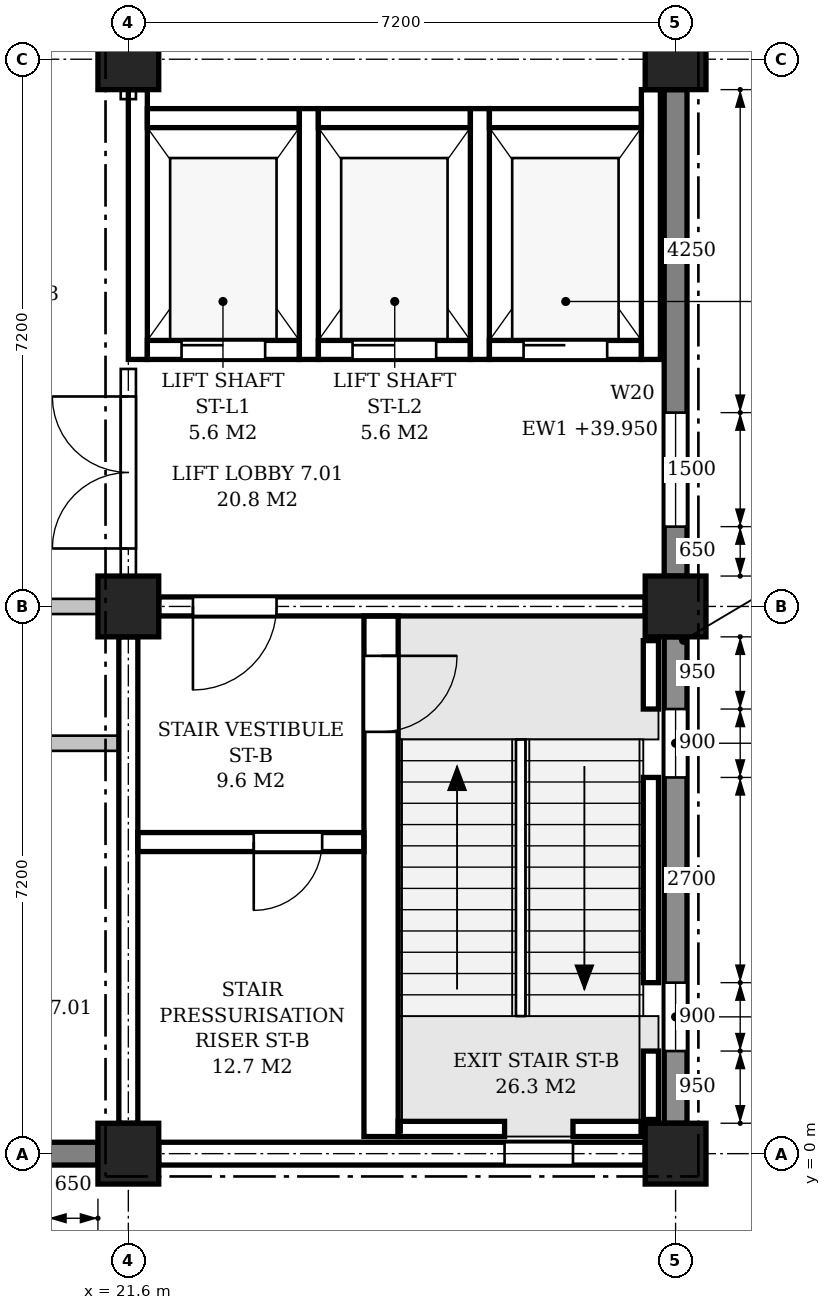
"""IFC4 building model, lengths in metres.
Left out: names, types, materials, properties, quantities, classifications, styles, units other than length and angle.
Written with IfcOpenShell. Run it as: python <this file> out.ifc"""

import sys

from ifc_helpers import new_model, si_unit, direction, frame, frame_2d, origin, origin_2d, place, context, subcontext, project, spatial, polyline, rectangle, outline, extrude, element, fill, save


model = new_model("IFC4")
c1 = context("Model", 3, precision=1e-05, world=origin(), true_north=direction((0.0, 1.0)))
c2 = subcontext(c1, "Body", "Model", "MODEL_VIEW")
j1 = project(units=[si_unit("LENGTHUNIT", "METRE"), si_unit("PLANEANGLEUNIT", "RADIAN")], contexts=[c1])
p1 = place(None, origin())
s1 = spatial("IfcSite", under=j1, at=p1, CompositionType="ELEMENT")
p2 = place(p1, origin())
s2 = spatial("IfcBuilding", under=s1, at=p2, CompositionType="ELEMENT")
p3 = place(p2, frame((0.0, 0.0, 36.0)))
s3 = spatial("IfcBuildingStorey", under=s2, at=p3, CompositionType="ELEMENT", Elevation=36.0)
for number, where, z_axis, x_axis in (
    (1, (21.6, 0.0, 0.0), (0.0, 0.0, 1.0), (1.0, 0.0, 0.0)),
    (2, (21.6, 7.2, 0.0), (0.0, 0.0, 1.0), (1.0, 0.0, 0.0)),
    (3, (21.6, 14.4, 0.0), (0.0, 0.0, 1.0), (1.0, 0.0, 0.0)),
    (4, (28.8, 0.0, 0.0), (0.0, 0.0, 1.0), (1.0, 0.0, 0.0)),
    (5, (28.8, 7.2, 0.0), (0.0, 0.0, 1.0), (1.0, 0.0, 0.0)),
    (6, (28.8, 14.4, 0.0), (0.0, 0.0, 1.0), (1.0, 0.0, 0.0)),
):
    element("IfcColumn", number, at=place(p3, frame(where, z_axis=z_axis, x_axis=x_axis)), inside=s3, PredefinedType="COLUMN", context=c2, shape_type="SweptSolid", body=[
        extrude(rectangle(XDim=0.8, YDim=0.8, at=origin_2d()), origin(), (0.0, 0.0, 1.0), 4.8),
    ])
p4 = place(p3, frame((14.8, 0.0, 0.0), z_axis=(0.0, 0.0, 1.0), x_axis=(1.0, 0.0, 0.0)))
e7 = element("IfcWall", 7, at=p4, inside=s3, PredefinedType="STANDARD", context=c2, shape_type="SweptSolid", body=[
    extrude(rectangle(XDim=6.4, YDim=0.3, at=frame_2d((3.2, 0.0))), origin(), (0.0, 0.0, 1.0), 3.95),
])
p5 = place(p4, frame((0.65, 0.0, 0.9)))
e8 = element("IfcOpeningElement", 8, at=p5, cuts=e7, PredefinedType="OPENING", context=c2, shape_type="SweptSolid", body=[
    extrude(outline(polyline([(0.0, 0.0), (1.5, 0.0), (1.5, 2.25), (0.75, 3.0), (0.0, 2.25), (0.0, 0.0)])), frame((0.0, 0.16, 0.0), z_axis=(0.0, -1.0, 0.0), x_axis=(1.0, 0.0, 0.0)), (0.0, 0.0, 1.0), 0.32),
])
p6 = place(p4, frame((4.25, 0.0, 0.9)))
e9 = element("IfcOpeningElement", 9, at=p6, cuts=e7, PredefinedType="OPENING", context=c2, shape_type="SweptSolid", body=[
    extrude(outline(polyline([(0.0, 0.0), (1.5, 0.0), (1.5, 2.25), (0.75, 3.0), (0.0, 2.25), (0.0, 0.0)])), frame((0.0, 0.16, 0.0), z_axis=(0.0, -1.0, 0.0), x_axis=(1.0, 0.0, 0.0)), (0.0, 0.0, 1.0), 0.32),
])
p7 = place(p3, frame((22.0, 0.0, 0.0), z_axis=(0.0, 0.0, 1.0), x_axis=(1.0, 0.0, 0.0)))
e10 = element("IfcWall", 10, at=p7, inside=s3, PredefinedType="STANDARD", context=c2, shape_type="SweptSolid", body=[
    extrude(rectangle(XDim=6.4, YDim=0.3, at=frame_2d((3.2, 0.0))), origin(), (0.0, 0.0, 1.0), 3.95),
])
p8 = place(p7, frame((4.55, 0.0, 0.9)))
e11 = element("IfcOpeningElement", 11, at=p8, cuts=e10, PredefinedType="OPENING", context=c2, shape_type="SweptSolid", body=[
    extrude(outline(polyline([(0.0, 0.0), (0.9, 0.0), (0.9, 2.55), (0.45, 3.0), (0.0, 2.55), (0.0, 0.0)])), frame((0.0, 0.16, 0.0), z_axis=(0.0, -1.0, 0.0), x_axis=(1.0, 0.0, 0.0)), (0.0, 0.0, 1.0), 0.32),
])
p9 = place(p3, frame((28.8, 0.4, 0.0), z_axis=(0.0, 0.0, 1.0), x_axis=(0.0, 1.0, 0.0)))
e12 = element("IfcWall", 12, at=p9, inside=s3, PredefinedType="STANDARD", context=c2, shape_type="SweptSolid", body=[
    extrude(rectangle(XDim=6.4, YDim=0.3, at=frame_2d((3.2, 0.0))), origin(), (0.0, 0.0, 1.0), 3.95),
])
p10 = place(p9, frame((0.95, 0.0, 0.9)))
e13 = element("IfcOpeningElement", 13, at=p10, cuts=e12, PredefinedType="OPENING", context=c2, shape_type="SweptSolid", body=[
    extrude(outline(polyline([(0.0, 0.0), (0.9, 0.0), (0.9, 2.55), (0.45, 3.0), (0.0, 2.55), (0.0, 0.0)])), frame((0.0, 0.16, 0.0), z_axis=(0.0, -1.0, 0.0), x_axis=(1.0, 0.0, 0.0)), (0.0, 0.0, 1.0), 0.32),
])
p11 = place(p9, frame((4.55, 0.0, 0.9)))
e14 = element("IfcOpeningElement", 14, at=p11, cuts=e12, PredefinedType="OPENING", context=c2, shape_type="SweptSolid", body=[
    extrude(outline(polyline([(0.0, 0.0), (0.9, 0.0), (0.9, 2.55), (0.45, 3.0), (0.0, 2.55), (0.0, 0.0)])), frame((0.0, 0.16, 0.0), z_axis=(0.0, -1.0, 0.0), x_axis=(1.0, 0.0, 0.0)), (0.0, 0.0, 1.0), 0.32),
])
p12 = place(p3, frame((28.8, 7.6, 0.0), z_axis=(0.0, 0.0, 1.0), x_axis=(0.0, 1.0, 0.0)))
e15 = element("IfcWall", 15, at=p12, inside=s3, PredefinedType="STANDARD", context=c2, shape_type="SweptSolid", body=[
    extrude(rectangle(XDim=6.4, YDim=0.3, at=frame_2d((3.2, 0.0))), origin(), (0.0, 0.0, 1.0), 3.95),
])
p13 = place(p12, frame((0.65, 0.0, 0.9)))
e16 = element("IfcOpeningElement", 16, at=p13, cuts=e15, PredefinedType="OPENING", context=c2, shape_type="SweptSolid", body=[
    extrude(outline(polyline([(0.0, 0.0), (1.5, 0.0), (1.5, 2.25), (0.75, 3.0), (0.0, 2.25), (0.0, 0.0)])), frame((0.0, 0.16, 0.0), z_axis=(0.0, -1.0, 0.0), x_axis=(1.0, 0.0, 0.0)), (0.0, 0.0, 1.0), 0.32),
])
p14 = place(p3, frame((22.0, 7.2, 0.0), z_axis=(0.0, 0.0, 1.0), x_axis=(1.0, 0.0, 0.0)))
e17 = element("IfcWall", 17, at=p14, inside=s3, PredefinedType="SHEAR", context=c2, shape_type="SweptSolid", body=[
    extrude(rectangle(XDim=6.4, YDim=0.25, at=frame_2d((3.2, 0.0))), origin(), (0.0, 0.0, 1.0), 3.85),
])
p15 = place(p14, frame((0.45, 0.0, 0.0)))
e18 = element("IfcOpeningElement", 18, at=p15, cuts=e17, PredefinedType="OPENING", context=c2, shape_type="SweptSolid", body=[
    extrude(rectangle(XDim=1.1, YDim=2.1, at=frame_2d((0.55, 1.05))), frame((0.0, 0.135, 0.0), z_axis=(0.0, -1.0, 0.0), x_axis=(1.0, 0.0, 0.0)), (0.0, 0.0, 1.0), 0.27),
])
p16 = place(p3, frame((21.6, 0.4, 0.0), z_axis=(0.0, 0.0, 1.0), x_axis=(0.0, 1.0, 0.0)))
e19 = element("IfcWall", 19, at=p16, inside=s3, PredefinedType="SHEAR", context=c2, shape_type="SweptSolid", body=[
    extrude(rectangle(XDim=6.4, YDim=0.25, at=frame_2d((3.2, 0.0))), origin(), (0.0, 0.0, 1.0), 3.85),
])
p17 = place(p3, frame((28.475, 0.45, -0.25), z_axis=(0.0, 0.0, 1.0), x_axis=(0.0, 1.0, 0.0)))
e20 = element("IfcWall", 20, at=p17, inside=s3, PredefinedType="SHEAR", context=c2, shape_type="SweptSolid", body=[
    extrude(rectangle(XDim=0.9, YDim=0.2, at=frame_2d((0.45, 0.0))), origin(), (0.0, 0.0, 1.0), 4.8),
])
p18 = place(p3, frame((28.475, 2.25, -0.25), z_axis=(0.0, 0.0, 1.0), x_axis=(0.0, 1.0, 0.0)))
e21 = element("IfcWall", 21, at=p18, inside=s3, PredefinedType="SHEAR", context=c2, shape_type="SweptSolid", body=[
    extrude(rectangle(XDim=2.7, YDim=0.2, at=frame_2d((1.35, 0.0))), origin(), (0.0, 0.0, 1.0), 4.8),
])
p19 = place(p3, frame((28.475, 5.85, -0.25), z_axis=(0.0, 0.0, 1.0), x_axis=(0.0, 1.0, 0.0)))
e22 = element("IfcWall", 22, at=p19, inside=s3, PredefinedType="SHEAR", context=c2, shape_type="SweptSolid", body=[
    extrude(rectangle(XDim=0.9, YDim=0.2, at=frame_2d((0.45, 0.0))), origin(), (0.0, 0.0, 1.0), 4.8),
])
p20 = place(p3, frame((25.15, 0.325, -0.25), z_axis=(0.0, 0.0, 1.0), x_axis=(1.0, 0.0, 0.0)))
e23 = element("IfcWall", 23, at=p20, inside=s3, PredefinedType="SHEAR", context=c2, shape_type="SweptSolid", body=[
    extrude(rectangle(XDim=1.4, YDim=0.2, at=frame_2d((0.7, 0.0))), origin(), (0.0, 0.0, 1.0), 4.8),
])
p21 = place(p3, frame((27.45, 0.325, -0.25), z_axis=(0.0, 0.0, 1.0), x_axis=(1.0, 0.0, 0.0)))
e24 = element("IfcWall", 24, at=p21, inside=s3, PredefinedType="SHEAR", context=c2, shape_type="SweptSolid", body=[
    extrude(rectangle(XDim=0.9, YDim=0.2, at=frame_2d((0.45, 0.0))), origin(), (0.0, 0.0, 1.0), 4.8),
])
p22 = place(p3, frame((24.925, 0.225, 0.0), z_axis=(0.0, 0.0, 1.0), x_axis=(0.0, 1.0, 0.0)))
e25 = element("IfcWall", 25, at=p22, inside=s3, PredefinedType="SHEAR", context=c2, shape_type="SweptSolid", body=[
    extrude(rectangle(XDim=6.85, YDim=0.45, at=frame_2d((3.425, 0.0))), origin(), (0.0, 0.0, 1.0), 4.55),
])
p23 = place(p22, frame((5.325, 0.0, 0.0)))
e26 = element("IfcOpeningElement", 26, at=p23, cuts=e25, PredefinedType="OPENING", context=c2, shape_type="SweptSolid", body=[
    extrude(rectangle(XDim=1.0, YDim=2.1, at=frame_2d((0.5, 1.05))), frame((0.0, 0.235, 0.0), z_axis=(0.0, -1.0, 0.0), x_axis=(1.0, 0.0, 0.0)), (0.0, 0.0, 1.0), 0.47),
])
p24 = place(p3, frame((21.725, 4.1, 0.0), z_axis=(0.0, 0.0, 1.0), x_axis=(1.0, 0.0, 0.0)))
e27 = element("IfcWall", 27, at=p24, inside=s3, PredefinedType="SHEAR", context=c2, shape_type="SweptSolid", body=[
    extrude(rectangle(XDim=2.975, YDim=0.25, at=frame_2d((1.487, 0.0))), origin(), (0.0, 0.0, 1.0), 4.55),
])
p25 = place(p24, frame((1.525, 0.0, 0.0)))
e28 = element("IfcOpeningElement", 28, at=p25, cuts=e27, PredefinedType="OPENING", context=c2, shape_type="SweptSolid", body=[
    extrude(rectangle(XDim=0.9, YDim=2.1, at=frame_2d((0.45, 1.05))), frame((0.0, 0.135, 0.0), z_axis=(0.0, -1.0, 0.0), x_axis=(1.0, 0.0, 0.0)), (0.0, 0.0, 1.0), 0.27),
])
p26 = place(p3, frame((21.725, 10.45, -0.25), z_axis=(0.0, 0.0, 1.0), x_axis=(0.0, 1.0, 0.0)))
e29 = element("IfcWall", 29, at=p26, inside=s3, PredefinedType="SHEAR", context=c2, shape_type="SweptSolid", body=[
    extrude(rectangle(XDim=3.55, YDim=0.25, at=frame_2d((1.775, 0.0))), origin(), (0.0, 0.0, 1.0), 4.1),
])
for number, where, z_axis, x_axis in (
    (30, (23.975, 10.45, -0.25), (0.0, 0.0, 1.0), (0.0, 1.0, 0.0)),
    (31, (26.225, 10.45, -0.25), (0.0, 0.0, 1.0), (0.0, 1.0, 0.0)),
):
    element("IfcWall", number, at=place(p3, frame(where, z_axis=z_axis, x_axis=x_axis)), inside=s3, PredefinedType="SHEAR", context=c2, shape_type="SweptSolid", body=[
        extrude(rectangle(XDim=3.3, YDim=0.25, at=frame_2d((1.65, 0.0))), origin(), (0.0, 0.0, 1.0), 4.8),
    ])
p27 = place(p3, frame((28.475, 10.45, -0.25), z_axis=(0.0, 0.0, 1.0), x_axis=(0.0, 1.0, 0.0)))
e32 = element("IfcWall", 32, at=p27, inside=s3, PredefinedType="SHEAR", context=c2, shape_type="SweptSolid", body=[
    extrude(rectangle(XDim=3.55, YDim=0.25, at=frame_2d((1.775, 0.0))), origin(), (0.0, 0.0, 1.0), 4.8),
])
p28 = place(p3, frame((21.85, 10.575, -0.25), z_axis=(0.0, 0.0, 1.0), x_axis=(1.0, 0.0, 0.0)))
e33 = element("IfcWall", 33, at=p28, inside=s3, PredefinedType="SHEAR", context=c2, shape_type="SweptSolid", body=[
    extrude(rectangle(XDim=2.0, YDim=0.25, at=frame_2d((1.0, 0.0))), origin(), (0.0, 0.0, 1.0), 4.8),
])
p29 = place(p28, frame((0.45, 0.0, 0.25)))
e34 = element("IfcOpeningElement", 34, at=p29, cuts=e33, PredefinedType="OPENING", context=c2, shape_type="SweptSolid", body=[
    extrude(rectangle(XDim=1.1, YDim=2.1, at=frame_2d((0.55, 1.05))), frame((0.0, 0.135, 0.0), z_axis=(0.0, -1.0, 0.0), x_axis=(1.0, 0.0, 0.0)), (0.0, 0.0, 1.0), 0.27),
])
p30 = place(p3, frame((21.85, 13.625, -0.25), z_axis=(0.0, 0.0, 1.0), x_axis=(1.0, 0.0, 0.0)))
e35 = element("IfcWall", 35, at=p30, inside=s3, PredefinedType="SHEAR", context=c2, shape_type="SweptSolid", body=[
    extrude(rectangle(XDim=2.0, YDim=0.25, at=frame_2d((1.0, 0.0))), origin(), (0.0, 0.0, 1.0), 4.8),
])
p31 = place(p3, frame((24.1, 10.575, -0.25), z_axis=(0.0, 0.0, 1.0), x_axis=(1.0, 0.0, 0.0)))
e36 = element("IfcWall", 36, at=p31, inside=s3, PredefinedType="SHEAR", context=c2, shape_type="SweptSolid", body=[
    extrude(rectangle(XDim=2.0, YDim=0.25, at=frame_2d((1.0, 0.0))), origin(), (0.0, 0.0, 1.0), 4.8),
])
p32 = place(p31, frame((0.45, 0.0, 0.25)))
e37 = element("IfcOpeningElement", 37, at=p32, cuts=e36, PredefinedType="OPENING", context=c2, shape_type="SweptSolid", body=[
    extrude(rectangle(XDim=1.1, YDim=2.1, at=frame_2d((0.55, 1.05))), frame((0.0, 0.135, 0.0), z_axis=(0.0, -1.0, 0.0), x_axis=(1.0, 0.0, 0.0)), (0.0, 0.0, 1.0), 0.27),
])
p33 = place(p3, frame((24.1, 13.625, -0.25), z_axis=(0.0, 0.0, 1.0), x_axis=(1.0, 0.0, 0.0)))
e38 = element("IfcWall", 38, at=p33, inside=s3, PredefinedType="SHEAR", context=c2, shape_type="SweptSolid", body=[
    extrude(rectangle(XDim=2.0, YDim=0.25, at=frame_2d((1.0, 0.0))), origin(), (0.0, 0.0, 1.0), 4.8),
])
p34 = place(p3, frame((26.35, 10.575, -0.25), z_axis=(0.0, 0.0, 1.0), x_axis=(1.0, 0.0, 0.0)))
e39 = element("IfcWall", 39, at=p34, inside=s3, PredefinedType="SHEAR", context=c2, shape_type="SweptSolid", body=[
    extrude(rectangle(XDim=2.0, YDim=0.25, at=frame_2d((1.0, 0.0))), origin(), (0.0, 0.0, 1.0), 4.8),
])
p35 = place(p34, frame((0.45, 0.0, 0.25)))
e40 = element("IfcOpeningElement", 40, at=p35, cuts=e39, PredefinedType="OPENING", context=c2, shape_type="SweptSolid", body=[
    extrude(rectangle(XDim=1.1, YDim=2.1, at=frame_2d((0.55, 1.05))), frame((0.0, 0.135, 0.0), z_axis=(0.0, -1.0, 0.0), x_axis=(1.0, 0.0, 0.0)), (0.0, 0.0, 1.0), 0.27),
])
p36 = place(p3, frame((26.35, 13.625, -0.25), z_axis=(0.0, 0.0, 1.0), x_axis=(1.0, 0.0, 0.0)))
e41 = element("IfcWall", 41, at=p36, inside=s3, PredefinedType="SHEAR", context=c2, shape_type="SweptSolid", body=[
    extrude(rectangle(XDim=2.0, YDim=0.25, at=frame_2d((1.0, 0.0))), origin(), (0.0, 0.0, 1.0), 4.8),
])
p37 = place(p3, frame((7.325, 5.4, 0.0), z_axis=(0.0, 0.0, 1.0), x_axis=(1.0, 0.0, 0.0)))
e42 = element("IfcWall", 42, at=p37, inside=s3, PredefinedType="PARTITIONING", context=c2, shape_type="SweptSolid", body=[
    extrude(outline(polyline([(0.0, 0.0), (14.15, 0.0), (14.15, 3.85), (14.05, 3.85), (14.05, 4.55), (7.3, 4.55), (7.3, 3.85), (6.85, 3.85), (6.85, 4.55), (0.1, 4.55), (0.1, 3.85), (0.0, 3.85), (0.0, 0.0)])), frame((0.0, 0.1, 0.0), z_axis=(0.0, -1.0, 0.0), x_axis=(1.0, 0.0, 0.0)), (0.0, 0.0, 1.0), 0.2),
])
p38 = place(p37, frame((1.238, 0.0, 0.0)))
e43 = element("IfcOpeningElement", 43, at=p38, cuts=e42, PredefinedType="OPENING", context=c2, shape_type="SweptSolid", body=[
    extrude(rectangle(XDim=1.0, YDim=2.1, at=frame_2d((0.5, 1.05))), frame((0.0, 0.11, 0.0), z_axis=(0.0, -1.0, 0.0), x_axis=(1.0, 0.0, 0.0)), (0.0, 0.0, 1.0), 0.22),
])
p39 = place(p37, frame((4.775, 0.0, 0.0)))
e44 = element("IfcOpeningElement", 44, at=p39, cuts=e42, PredefinedType="OPENING", context=c2, shape_type="SweptSolid", body=[
    extrude(rectangle(XDim=1.0, YDim=2.1, at=frame_2d((0.5, 1.05))), frame((0.0, 0.11, 0.0), z_axis=(0.0, -1.0, 0.0), x_axis=(1.0, 0.0, 0.0)), (0.0, 0.0, 1.0), 0.22),
])
p40 = place(p37, frame((8.375, 0.0, 0.0)))
e45 = element("IfcOpeningElement", 45, at=p40, cuts=e42, PredefinedType="OPENING", context=c2, shape_type="SweptSolid", body=[
    extrude(rectangle(XDim=1.0, YDim=2.1, at=frame_2d((0.5, 1.05))), frame((0.0, 0.11, 0.0), z_axis=(0.0, -1.0, 0.0), x_axis=(1.0, 0.0, 0.0)), (0.0, 0.0, 1.0), 0.22),
])
p41 = place(p37, frame((11.913, 0.0, 0.0)))
e46 = element("IfcOpeningElement", 46, at=p41, cuts=e42, PredefinedType="OPENING", context=c2, shape_type="SweptSolid", body=[
    extrude(rectangle(XDim=1.0, YDim=2.1, at=frame_2d((0.5, 1.05))), frame((0.0, 0.11, 0.0), z_axis=(0.0, -1.0, 0.0), x_axis=(1.0, 0.0, 0.0)), (0.0, 0.0, 1.0), 0.22),
])
p42 = place(p3, frame((14.8, 7.2, 0.0), z_axis=(0.0, 0.0, 1.0), x_axis=(1.0, 0.0, 0.0)))
e47 = element("IfcWall", 47, at=p42, inside=s3, PredefinedType="PARTITIONING", context=c2, shape_type="SweptSolid", body=[
    extrude(rectangle(XDim=6.4, YDim=0.2, at=frame_2d((3.2, 0.0))), origin(), (0.0, 0.0, 1.0), 3.85),
])
p43 = place(p42, frame((4.3, 0.0, 0.0)))
e48 = element("IfcOpeningElement", 48, at=p43, cuts=e47, PredefinedType="OPENING", context=c2, shape_type="SweptSolid", body=[
    extrude(rectangle(XDim=1.0, YDim=2.1, at=frame_2d((0.5, 1.05))), frame((0.0, 0.11, 0.0), z_axis=(0.0, -1.0, 0.0), x_axis=(1.0, 0.0, 0.0)), (0.0, 0.0, 1.0), 0.22),
])
p44 = place(p3, frame((21.6, 7.6, 0.0), z_axis=(0.0, 0.0, 1.0), x_axis=(0.0, 1.0, 0.0)))
e49 = element("IfcWall", 49, at=p44, inside=s3, PredefinedType="PARTITIONING", context=c2, shape_type="SweptSolid", body=[
    extrude(rectangle(XDim=2.725, YDim=0.2, at=frame_2d((1.362, 0.0))), origin(), (0.0, 0.0, 1.0), 3.85),
])
p45 = place(p44, frame((0.362, 0.0, 0.0)))
e50 = element("IfcOpeningElement", 50, at=p45, cuts=e49, PredefinedType="OPENING", context=c2, shape_type="SweptSolid", body=[
    extrude(rectangle(XDim=2.0, YDim=2.4, at=frame_2d((1.0, 1.2))), frame((0.0, 0.11, 0.0), z_axis=(0.0, -1.0, 0.0), x_axis=(1.0, 0.0, 0.0)), (0.0, 0.0, 1.0), 0.22),
])
p46 = place(p3, frame((21.6, 13.875, 0.0), z_axis=(0.0, 0.0, 1.0), x_axis=(0.0, 1.0, 0.0)))
e51 = element("IfcWall", 51, at=p46, inside=s3, PredefinedType="PARTITIONING", context=c2, shape_type="SweptSolid", body=[
    extrude(rectangle(XDim=0.125, YDim=0.2, at=frame_2d((0.062, 0.0))), origin(), (0.0, 0.0, 1.0), 3.85),
])
p47 = place(p10, origin())
e52 = element("IfcWindow", 52, at=p47, inside=s3, PartitioningType="SINGLE_PANEL", PredefinedType="WINDOW", context=c2, shape_type="SweptSolid", body=[
    extrude(outline(polyline([(0.0, 0.0), (0.9, 0.0), (0.9, 2.55), (0.45, 3.0), (0.0, 2.55), (0.0, 0.0)])), frame((0.0, 0.03, 0.0), z_axis=(0.0, -1.0, 0.0), x_axis=(1.0, 0.0, 0.0)), (0.0, 0.0, 1.0), 0.06),
])
fill(e13, e52)
p48 = place(p11, origin())
e53 = element("IfcWindow", 53, at=p48, inside=s3, PartitioningType="SINGLE_PANEL", PredefinedType="WINDOW", context=c2, shape_type="SweptSolid", body=[
    extrude(outline(polyline([(0.0, 0.0), (0.9, 0.0), (0.9, 2.55), (0.45, 3.0), (0.0, 2.55), (0.0, 0.0)])), frame((0.0, 0.03, 0.0), z_axis=(0.0, -1.0, 0.0), x_axis=(1.0, 0.0, 0.0)), (0.0, 0.0, 1.0), 0.06),
])
fill(e14, e53)
p49 = place(p13, origin())
e54 = element("IfcWindow", 54, at=p49, inside=s3, PartitioningType="SINGLE_PANEL", PredefinedType="WINDOW", context=c2, shape_type="SweptSolid", body=[
    extrude(outline(polyline([(0.0, 0.0), (1.5, 0.0), (1.5, 2.25), (0.75, 3.0), (0.0, 2.25), (0.0, 0.0)])), frame((0.0, 0.03, 0.0), z_axis=(0.0, -1.0, 0.0), x_axis=(1.0, 0.0, 0.0)), (0.0, 0.0, 1.0), 0.06),
])
fill(e16, e54)
p50 = place(p8, origin())
e55 = element("IfcWindow", 55, at=p50, inside=s3, PartitioningType="SINGLE_PANEL", PredefinedType="WINDOW", context=c2, shape_type="SweptSolid", body=[
    extrude(outline(polyline([(0.0, 0.0), (0.9, 0.0), (0.9, 2.55), (0.45, 3.0), (0.0, 2.55), (0.0, 0.0)])), frame((0.0, 0.03, 0.0), z_axis=(0.0, -1.0, 0.0), x_axis=(1.0, 0.0, 0.0)), (0.0, 0.0, 1.0), 0.06),
])
fill(e11, e55)
p51 = place(p23, frame((1.0, 0.0, 0.0), z_axis=(0.0, 0.0, 1.0), x_axis=(-1.0, 0.0, 0.0)))
e56 = element("IfcDoor", 56, at=p51, inside=s3, OperationType="SINGLE_SWING_LEFT", PredefinedType="DOOR", context=c2, shape_type="SweptSolid", body=[
    extrude(rectangle(XDim=1.0, YDim=2.1, at=frame_2d((0.5, 1.05))), frame((0.0, 0.025, 0.0), z_axis=(0.0, -1.0, 0.0), x_axis=(1.0, 0.0, 0.0)), (0.0, 0.0, 1.0), 0.05),
])
fill(e26, e56)
p52 = place(p15, frame((1.1, 0.0, 0.0), z_axis=(0.0, 0.0, 1.0), x_axis=(-1.0, 0.0, 0.0)))
e57 = element("IfcDoor", 57, at=p52, inside=s3, OperationType="SINGLE_SWING_RIGHT", PredefinedType="DOOR", context=c2, shape_type="SweptSolid", body=[
    extrude(rectangle(XDim=1.1, YDim=2.1, at=frame_2d((0.55, 1.05))), frame((0.0, 0.025, 0.0), z_axis=(0.0, -1.0, 0.0), x_axis=(1.0, 0.0, 0.0)), (0.0, 0.0, 1.0), 0.05),
])
fill(e18, e57)
p53 = place(p25, frame((0.9, 0.0, 0.0), z_axis=(0.0, 0.0, 1.0), x_axis=(-1.0, 0.0, 0.0)))
e58 = element("IfcDoor", 58, at=p53, inside=s3, OperationType="SINGLE_SWING_RIGHT", PredefinedType="DOOR", context=c2, shape_type="SweptSolid", body=[
    extrude(rectangle(XDim=0.9, YDim=2.1, at=frame_2d((0.45, 1.05))), frame((0.0, 0.025, 0.0), z_axis=(0.0, -1.0, 0.0), x_axis=(1.0, 0.0, 0.0)), (0.0, 0.0, 1.0), 0.05),
])
fill(e28, e58)
p54 = place(p29, origin())
e59 = element("IfcDoor", 59, at=p54, inside=s3, OperationType="SLIDING_TO_LEFT", PredefinedType="DOOR", context=c2, shape_type="SweptSolid", body=[
    extrude(rectangle(XDim=1.1, YDim=2.1, at=frame_2d((0.55, 1.05))), frame((0.0, 0.025, 0.0), z_axis=(0.0, -1.0, 0.0), x_axis=(1.0, 0.0, 0.0)), (0.0, 0.0, 1.0), 0.05),
])
fill(e34, e59)
p55 = place(p32, origin())
e60 = element("IfcDoor", 60, at=p55, inside=s3, OperationType="SLIDING_TO_LEFT", PredefinedType="DOOR", context=c2, shape_type="SweptSolid", body=[
    extrude(rectangle(XDim=1.1, YDim=2.1, at=frame_2d((0.55, 1.05))), frame((0.0, 0.025, 0.0), z_axis=(0.0, -1.0, 0.0), x_axis=(1.0, 0.0, 0.0)), (0.0, 0.0, 1.0), 0.05),
])
fill(e37, e60)
p56 = place(p35, origin())
e61 = element("IfcDoor", 61, at=p56, inside=s3, OperationType="SLIDING_TO_LEFT", PredefinedType="DOOR", context=c2, shape_type="SweptSolid", body=[
    extrude(rectangle(XDim=1.1, YDim=2.1, at=frame_2d((0.55, 1.05))), frame((0.0, 0.025, 0.0), z_axis=(0.0, -1.0, 0.0), x_axis=(1.0, 0.0, 0.0)), (0.0, 0.0, 1.0), 0.05),
])
fill(e40, e61)
p57 = place(p45, origin())
e62 = element("IfcDoor", 62, at=p57, inside=s3, OperationType="DOUBLE_DOOR_SINGLE_SWING", PredefinedType="DOOR", context=c2, shape_type="SweptSolid", body=[
    extrude(rectangle(XDim=2.0, YDim=2.4, at=frame_2d((1.0, 1.2))), frame((0.0, 0.025, 0.0), z_axis=(0.0, -1.0, 0.0), x_axis=(1.0, 0.0, 0.0)), (0.0, 0.0, 1.0), 0.05),
])
fill(e50, e62)
save(model, sys.argv[1])
